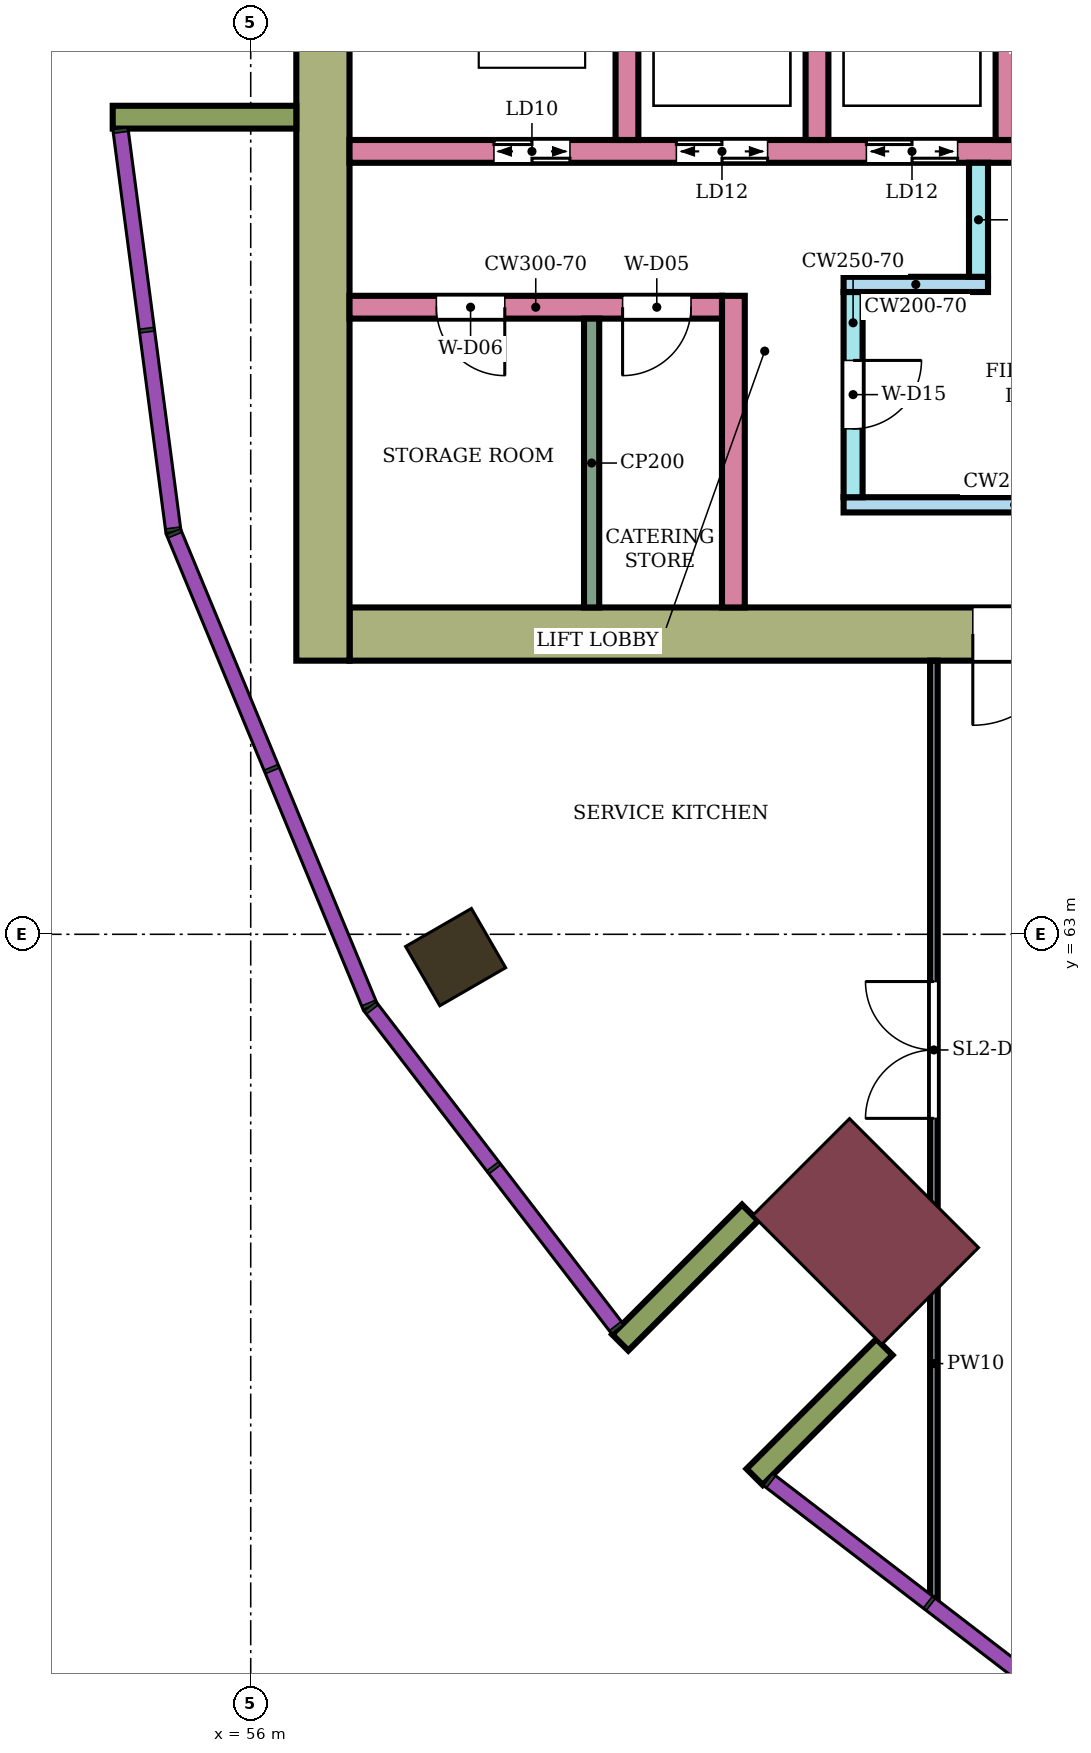
"""IFC4 building model, lengths in metres.
Left out: names, types, materials, properties, quantities, classifications, styles, units other than length and angle.
Written with IfcOpenShell. Run it as: python <this file> out.ifc"""

import sys

from ifc_helpers import new_model, si_unit, direction, frame, frame_2d, origin, origin_2d, place, context, subcontext, project, spatial, rectangle, extrude, element, fill, save


model = new_model("IFC4")
c1 = context("Model", 3, precision=1e-05, world=origin(), true_north=direction((0.0, 1.0)))
c2 = subcontext(c1, "Body", "Model", "MODEL_VIEW")
j1 = project(units=[si_unit("LENGTHUNIT", "METRE"), si_unit("PLANEANGLEUNIT", "RADIAN")], contexts=[c1])
p1 = place(None, origin())
s1 = spatial("IfcSite", under=j1, at=p1, CompositionType="ELEMENT")
p2 = place(p1, origin())
s2 = spatial("IfcBuilding", under=s1, at=p2, CompositionType="ELEMENT")
p3 = place(p2, frame((0.0, 0.0, 149.7)))
s3 = spatial("IfcBuildingStorey", under=s2, at=p3, CompositionType="ELEMENT", Elevation=149.7)
p4 = place(p3, frame((58.696, 62.7, 0.0), z_axis=(0.0, 0.0, 1.0), x_axis=(-0.866025403784, -0.5, 0.0)))
e1 = element("IfcColumn", 1, at=p4, inside=s3, PredefinedType="COLUMN", context=c2, shape_type="SweptSolid", body=[
    extrude(rectangle(XDim=1.0, YDim=0.9, at=origin_2d()), origin(), (0.0, 0.0, 1.0), 8.0),
])
p5 = place(p3, frame((64.09, 59.09, 0.0), z_axis=(0.0, 0.0, 1.0), x_axis=(-0.707106781187, -0.707106781187, 0.0)))
e2 = element("IfcColumn", 2, at=p5, inside=s3, PredefinedType="COLUMN", context=c2, shape_type="SweptSolid", body=[
    extrude(rectangle(XDim=1.8, YDim=2.4, at=origin_2d()), origin(), (0.0, 0.0, 1.0), 8.0),
])
p6 = place(p3, frame((72.1, 66.95, 0.0), z_axis=(0.0, 0.0, 1.0), x_axis=(-1.0, 0.0, 0.0)))
e3 = element("IfcWall", 3, at=p6, inside=s3, PredefinedType="SHEAR", context=c2, shape_type="SweptSolid", body=[
    extrude(rectangle(XDim=14.8, YDim=0.7, at=frame_2d((7.4, 0.0))), origin(), (0.0, 0.0, 1.0), 7.68),
])
p7 = place(p6, frame((4.2, 0.0, 0.0)))
e4 = element("IfcOpeningElement", 4, at=p7, cuts=e3, PredefinedType="OPENING", context=c2, shape_type="SweptSolid", body=[
    extrude(rectangle(XDim=2.4, YDim=2.4, at=frame_2d((1.2, 1.2))), frame((0.0, 0.36, 0.0), z_axis=(0.0, -1.0, 0.0), x_axis=(1.0, 0.0, 0.0)), (0.0, 0.0, 1.0), 0.72),
])
p8 = place(p3, frame((56.95, 83.4, 0.0), z_axis=(0.0, 0.0, 1.0), x_axis=(0.0, -1.0, 0.0)))
e5 = element("IfcWall", 5, at=p8, inside=s3, PredefinedType="SHEAR", context=c2, shape_type="SweptSolid", body=[
    extrude(rectangle(XDim=16.8, YDim=0.7, at=frame_2d((8.4, 0.0))), origin(), (0.0, 0.0, 1.0), 7.68),
])
p9 = place(p3, frame((68.3, 73.3, 0.0), z_axis=(0.0, 0.0, 1.0), x_axis=(-1.0, 0.0, 0.0)))
e6 = element("IfcWall", 6, at=p9, inside=s3, PredefinedType="SHEAR", context=c2, shape_type="SweptSolid", body=[
    extrude(rectangle(XDim=11.0, YDim=0.3, at=frame_2d((5.5, 0.0))), origin(), (0.0, 0.0, 1.0), 7.68),
])
p10 = place(p9, frame((0.55, 0.0, 0.0)))
e7 = element("IfcOpeningElement", 7, at=p10, cuts=e6, PredefinedType="OPENING", context=c2, shape_type="SweptSolid", body=[
    extrude(rectangle(XDim=1.1, YDim=2.1, at=frame_2d((0.55, 1.05))), frame((0.0, 0.16, 0.0), z_axis=(0.0, -1.0, 0.0), x_axis=(1.0, 0.0, 0.0)), (0.0, 0.0, 1.0), 0.32),
])
p11 = place(p9, frame((3.0, 0.0, 0.0)))
e8 = element("IfcOpeningElement", 8, at=p11, cuts=e6, PredefinedType="OPENING", context=c2, shape_type="SweptSolid", body=[
    extrude(rectangle(XDim=1.2, YDim=2.1, at=frame_2d((0.6, 1.05))), frame((0.0, 0.16, 0.0), z_axis=(0.0, -1.0, 0.0), x_axis=(1.0, 0.0, 0.0)), (0.0, 0.0, 1.0), 0.32),
])
p12 = place(p9, frame((5.5, 0.0, 0.0)))
e9 = element("IfcOpeningElement", 9, at=p12, cuts=e6, PredefinedType="OPENING", context=c2, shape_type="SweptSolid", body=[
    extrude(rectangle(XDim=1.2, YDim=2.1, at=frame_2d((0.6, 1.05))), frame((0.0, 0.16, 0.0), z_axis=(0.0, -1.0, 0.0), x_axis=(1.0, 0.0, 0.0)), (0.0, 0.0, 1.0), 0.32),
])
p13 = place(p9, frame((8.1, 0.0, 0.0)))
e10 = element("IfcOpeningElement", 10, at=p13, cuts=e6, PredefinedType="OPENING", context=c2, shape_type="SweptSolid", body=[
    extrude(rectangle(XDim=1.0, YDim=2.1, at=frame_2d((0.5, 1.05))), frame((0.0, 0.16, 0.0), z_axis=(0.0, -1.0, 0.0), x_axis=(1.0, 0.0, 0.0)), (0.0, 0.0, 1.0), 0.32),
])
for number, where, z_axis, x_axis in (
    (11, (65.95, 76.0, 0.0), (0.0, 0.0, 1.0), (0.0, -1.0, 0.0)),
    (12, (63.45, 76.0, 0.0), (0.0, 0.0, 1.0), (0.0, -1.0, 0.0)),
    (13, (60.95, 76.0, 0.0), (0.0, 0.0, 1.0), (0.0, -1.0, 0.0)),
):
    element("IfcWall", number, at=place(p3, frame(where, z_axis=z_axis, x_axis=x_axis)), inside=s3, PredefinedType="SHEAR", context=c2, shape_type="SweptSolid", body=[
        extrude(rectangle(XDim=2.55, YDim=0.3, at=frame_2d((1.275, 0.0))), origin(), (0.0, 0.0, 1.0), 7.68),
    ])
p14 = place(p3, frame((68.3, 68.65, 0.0), z_axis=(0.0, 0.0, 1.0), x_axis=(-1.0, 0.0, 0.0)))
e14 = element("IfcWall", 14, at=p14, inside=s3, PredefinedType="SHEAR", context=c2, shape_type="SweptSolid", body=[
    extrude(rectangle(XDim=4.5, YDim=0.2, at=frame_2d((2.25, 0.0))), origin(), (0.0, 0.0, 1.0), 7.68),
])
p15 = place(p3, frame((63.925, 71.45, 0.0), z_axis=(0.0, 0.0, 1.0), x_axis=(0.0, -1.0, 0.0)))
e15 = element("IfcWall", 15, at=p15, inside=s3, PredefinedType="SHEAR", context=c2, shape_type="SweptSolid", body=[
    extrude(rectangle(XDim=2.7, YDim=0.25, at=frame_2d((1.35, 0.0))), origin(), (0.0, 0.0, 1.0), 7.68),
])
p16 = place(p15, frame((0.9, 0.0, 0.0)))
e16 = element("IfcOpeningElement", 16, at=p16, cuts=e15, PredefinedType="OPENING", context=c2, shape_type="SweptSolid", body=[
    extrude(rectangle(XDim=0.9, YDim=2.1, at=frame_2d((0.45, 1.05))), frame((0.0, 0.135, 0.0), z_axis=(0.0, -1.0, 0.0), x_axis=(1.0, 0.0, 0.0)), (0.0, 0.0, 1.0), 0.27),
])
p17 = place(p3, frame((65.7, 71.55, 0.0), z_axis=(0.0, 0.0, 1.0), x_axis=(-1.0, 0.0, 0.0)))
e17 = element("IfcWall", 17, at=p17, inside=s3, PredefinedType="SHEAR", context=c2, shape_type="SweptSolid", body=[
    extrude(rectangle(XDim=1.9, YDim=0.2, at=frame_2d((0.95, 0.0))), origin(), (0.0, 0.0, 1.0), 7.68),
])
p18 = place(p3, frame((65.575, 73.15, 0.0), z_axis=(0.0, 0.0, 1.0), x_axis=(0.0, -1.0, 0.0)))
e18 = element("IfcWall", 18, at=p18, inside=s3, PredefinedType="SHEAR", context=c2, shape_type="SweptSolid", body=[
    extrude(rectangle(XDim=1.5, YDim=0.25, at=frame_2d((0.75, 0.0))), origin(), (0.0, 0.0, 1.0), 7.68),
])
p19 = place(p3, frame((62.35, 71.4, 0.0), z_axis=(0.0, 0.0, 1.0), x_axis=(0.0, -1.0, 0.0)))
e19 = element("IfcWall", 19, at=p19, inside=s3, PredefinedType="SHEAR", context=c2, shape_type="SweptSolid", body=[
    extrude(rectangle(XDim=4.1, YDim=0.3, at=frame_2d((2.05, 0.0))), origin(), (0.0, 0.0, 1.0), 7.68),
])
p20 = place(p3, frame((62.2, 71.25, 0.0), z_axis=(0.0, 0.0, 1.0), x_axis=(-1.0, 0.0, 0.0)))
e20 = element("IfcWall", 20, at=p20, inside=s3, PredefinedType="SHEAR", context=c2, shape_type="SweptSolid", body=[
    extrude(rectangle(XDim=4.9, YDim=0.3, at=frame_2d((2.45, 0.0))), origin(), (0.0, 0.0, 1.0), 7.68),
])
p21 = place(p20, frame((0.407, 0.0, 0.0)))
e21 = element("IfcOpeningElement", 21, at=p21, cuts=e20, PredefinedType="OPENING", context=c2, shape_type="SweptSolid", body=[
    extrude(rectangle(XDim=0.9, YDim=2.1, at=frame_2d((0.45, 1.05))), frame((0.0, 0.16, 0.0), z_axis=(0.0, -1.0, 0.0), x_axis=(1.0, 0.0, 0.0)), (0.0, 0.0, 1.0), 0.32),
])
p22 = place(p20, frame((2.857, 0.0, 0.0)))
e22 = element("IfcOpeningElement", 22, at=p22, cuts=e20, PredefinedType="OPENING", context=c2, shape_type="SweptSolid", body=[
    extrude(rectangle(XDim=0.9, YDim=2.1, at=frame_2d((0.45, 1.05))), frame((0.0, 0.16, 0.0), z_axis=(0.0, -1.0, 0.0), x_axis=(1.0, 0.0, 0.0)), (0.0, 0.0, 1.0), 0.32),
])
for number, where, z_axis, x_axis in (
    (23, (56.6, 73.75, 0.0), (0.0, 0.0, 1.0), (-1.0, 0.0, 0.0)),
    (24, (62.57, 59.338, 0.0), (0.0, 0.0, 1.0), (-0.707, -0.707, 0.0)),
    (25, (64.338, 57.57, 0.0), (0.0, 0.0, 1.0), (-0.707, -0.707, 0.0)),
):
    element("IfcWall", number, at=place(p3, frame(where, z_axis=z_axis, x_axis=x_axis)), inside=s3, PredefinedType="NOTDEFINED", context=c2, shape_type="SweptSolid", body=[
        extrude(rectangle(XDim=2.416, YDim=0.3, at=frame_2d((1.208, 0.0))), origin(), (0.0, 0.0, 1.0), 8.0),
    ])
p23 = place(p3, frame((64.988, 54.27, 0.0), z_axis=(0.0, 0.0, 1.0), x_axis=(0.0, 1.0, 0.0)))
e26 = element("IfcWall", 26, at=p23, inside=s3, PredefinedType="PARTITIONING", context=c2, shape_type="SweptSolid", body=[
    extrude(rectangle(XDim=12.33, YDim=0.1, at=frame_2d((6.165, 0.0))), origin(), (0.0, 0.0, 1.0), 7.55),
])
p24 = place(p23, frame((6.309, 0.0, 0.0)))
e27 = element("IfcOpeningElement", 27, at=p24, cuts=e26, PredefinedType="OPENING", context=c2, shape_type="SweptSolid", body=[
    extrude(rectangle(XDim=1.8, YDim=2.1, at=frame_2d((0.9, 1.05))), frame((0.0, 0.06, 0.0), z_axis=(0.0, -1.0, 0.0), x_axis=(1.0, 0.0, 0.0)), (0.0, 0.0, 1.0), 0.12),
])
p25 = place(p3, frame((60.485, 71.1, 0.0), z_axis=(0.0, 0.0, 1.0), x_axis=(0.0, -1.0, 0.0)))
e28 = element("IfcWall", 28, at=p25, inside=s3, PredefinedType="PARTITIONING", context=c2, shape_type="SweptSolid", body=[
    extrude(rectangle(XDim=3.8, YDim=0.2, at=frame_2d((1.9, 0.0))), origin(), (0.0, 0.0, 1.0), 7.68),
])
p26 = place(p24, origin())
e29 = element("IfcDoor", 29, at=p26, inside=s3, OperationType="DOUBLE_DOOR_SINGLE_SWING", PredefinedType="DOOR", context=c2, shape_type="SweptSolid", body=[
    extrude(rectangle(XDim=1.8, YDim=2.1, at=frame_2d((0.9, 1.05))), frame((0.0, 0.025, 0.0), z_axis=(0.0, -1.0, 0.0), x_axis=(1.0, 0.0, 0.0)), (0.0, 0.0, 1.0), 0.05),
])
fill(e27, e29)
p27 = place(p11, origin())
e30 = element("IfcDoor", 30, at=p27, inside=s3, OperationType="DOUBLE_DOOR_SLIDING", PredefinedType="DOOR", context=c2, shape_type="SweptSolid", body=[
    extrude(rectangle(XDim=1.2, YDim=2.1, at=frame_2d((0.6, 1.05))), frame((0.0, 0.025, 0.0), z_axis=(0.0, -1.0, 0.0), x_axis=(1.0, 0.0, 0.0)), (0.0, 0.0, 1.0), 0.05),
])
fill(e8, e30)
p28 = place(p12, origin())
e31 = element("IfcDoor", 31, at=p28, inside=s3, OperationType="DOUBLE_DOOR_SLIDING", PredefinedType="DOOR", context=c2, shape_type="SweptSolid", body=[
    extrude(rectangle(XDim=1.2, YDim=2.1, at=frame_2d((0.6, 1.05))), frame((0.0, 0.025, 0.0), z_axis=(0.0, -1.0, 0.0), x_axis=(1.0, 0.0, 0.0)), (0.0, 0.0, 1.0), 0.05),
])
fill(e9, e31)
p29 = place(p13, origin())
e32 = element("IfcDoor", 32, at=p29, inside=s3, OperationType="DOUBLE_DOOR_SLIDING", PredefinedType="DOOR", context=c2, shape_type="SweptSolid", body=[
    extrude(rectangle(XDim=1.0, YDim=2.1, at=frame_2d((0.5, 1.05))), frame((0.0, 0.025, 0.0), z_axis=(0.0, -1.0, 0.0), x_axis=(1.0, 0.0, 0.0)), (0.0, 0.0, 1.0), 0.05),
])
fill(e10, e32)
p30 = place(p16, origin())
e33 = element("IfcDoor", 33, at=p30, inside=s3, OperationType="SINGLE_SWING_LEFT", PredefinedType="DOOR", context=c2, shape_type="SweptSolid", body=[
    extrude(rectangle(XDim=0.9, YDim=2.1, at=frame_2d((0.45, 1.05))), frame((0.0, 0.025, 0.0), z_axis=(0.0, -1.0, 0.0), x_axis=(1.0, 0.0, 0.0)), (0.0, 0.0, 1.0), 0.05),
])
fill(e16, e33)
p31 = place(p21, origin())
e34 = element("IfcDoor", 34, at=p31, inside=s3, OperationType="SINGLE_SWING_RIGHT", PredefinedType="DOOR", context=c2, shape_type="SweptSolid", body=[
    extrude(rectangle(XDim=0.9, YDim=2.1, at=frame_2d((0.45, 1.05))), frame((0.0, 0.025, 0.0), z_axis=(0.0, -1.0, 0.0), x_axis=(1.0, 0.0, 0.0)), (0.0, 0.0, 1.0), 0.05),
])
fill(e21, e34)
p32 = place(p22, origin())
e35 = element("IfcDoor", 35, at=p32, inside=s3, OperationType="SINGLE_SWING_LEFT", PredefinedType="DOOR", context=c2, shape_type="SweptSolid", body=[
    extrude(rectangle(XDim=0.9, YDim=2.1, at=frame_2d((0.45, 1.05))), frame((0.0, 0.025, 0.0), z_axis=(0.0, -1.0, 0.0), x_axis=(1.0, 0.0, 0.0)), (0.0, 0.0, 1.0), 0.05),
])
fill(e22, e35)
p33 = place(p7, origin())
e36 = element("IfcDoor", 36, at=p33, inside=s3, OperationType="DOUBLE_DOOR_SINGLE_SWING", PredefinedType="DOOR", context=c2, shape_type="SweptSolid", body=[
    extrude(rectangle(XDim=2.4, YDim=2.4, at=frame_2d((1.2, 1.2))), frame((0.0, 0.025, 0.0), z_axis=(0.0, -1.0, 0.0), x_axis=(1.0, 0.0, 0.0)), (0.0, 0.0, 1.0), 0.05),
])
fill(e4, e36)
save(model, sys.argv[1])
